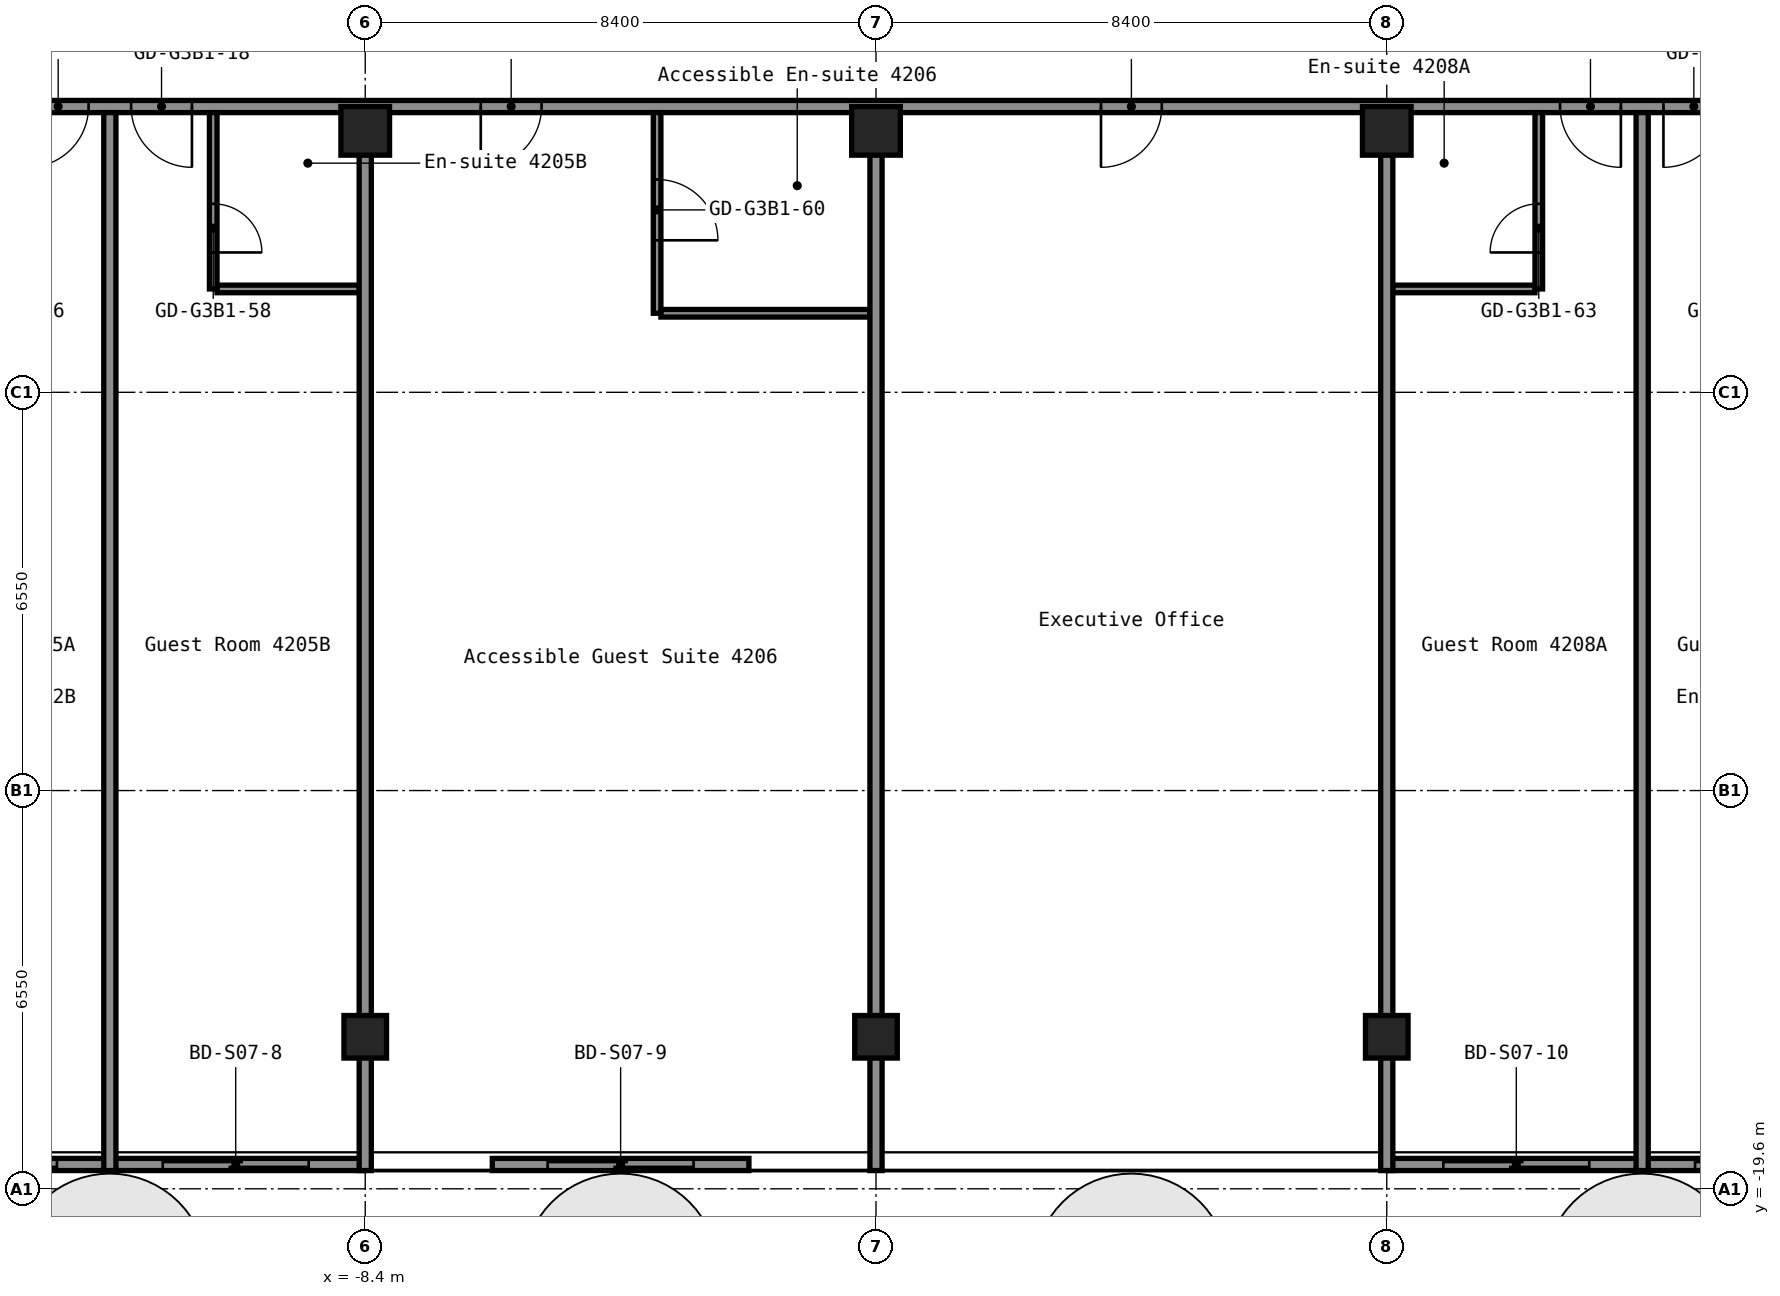
"""IFC4 building model, lengths in metres.
Left out: names, types, materials, properties, quantities, classifications, styles, units other than length and angle.
Written with IfcOpenShell. Run it as: python <this file> out.ifc"""

import sys

from ifc_helpers import new_model, si_unit, direction, frame, frame_2d, origin, origin_2d, place, context, subcontext, project, spatial, rectangle, hollow_rectangle, extrude, element, fill, save


model = new_model("IFC4")
c1 = context("Model", 3, precision=1e-05, world=origin(), true_north=direction((0.0, 1.0)))
c2 = subcontext(c1, "Body", "Model", "MODEL_VIEW")
j1 = project(units=[si_unit("LENGTHUNIT", "METRE"), si_unit("PLANEANGLEUNIT", "RADIAN")], contexts=[c1])
p1 = place(None, origin())
s1 = spatial("IfcSite", under=j1, at=p1, CompositionType="ELEMENT")
p2 = place(p1, origin())
s2 = spatial("IfcBuilding", under=s1, at=p2, CompositionType="ELEMENT")
p3 = place(p2, frame((0.0, 0.0, 150.2)))
s3 = spatial("IfcBuildingStorey", under=s2, at=p3, CompositionType="ELEMENT", Elevation=150.2)
p4 = place(p3, frame((-8.4, -17.1, 0.0), z_axis=(0.0, 0.0, 1.0), x_axis=(1.0, 0.0, 0.0)))
e1 = element("IfcColumn", 1, at=p4, inside=s3, PredefinedType="COLUMN", context=c2, shape_type="SweptSolid", body=[
    extrude(hollow_rectangle(XDim=0.7, YDim=0.7, WallThickness=0.028, at=origin_2d()), origin(), (0.0, 0.0, 1.0), 2.75),
])
p5 = place(p3, frame((-8.4, -2.2, 0.0), z_axis=(0.0, 0.0, 1.0), x_axis=(1.0, 0.0, 0.0)))
e2 = element("IfcColumn", 2, at=p5, inside=s3, PredefinedType="COLUMN", context=c2, shape_type="SweptSolid", body=[
    extrude(hollow_rectangle(XDim=0.8, YDim=0.8, WallThickness=0.032, at=origin_2d()), origin(), (0.0, 0.0, 1.0), 2.75),
])
p6 = place(p3, frame((0.0, -17.1, 0.0), z_axis=(0.0, 0.0, 1.0), x_axis=(1.0, 0.0, 0.0)))
e3 = element("IfcColumn", 3, at=p6, inside=s3, PredefinedType="COLUMN", context=c2, shape_type="SweptSolid", body=[
    extrude(hollow_rectangle(XDim=0.7, YDim=0.7, WallThickness=0.028, at=origin_2d()), origin(), (0.0, 0.0, 1.0), 2.75),
])
p7 = place(p3, frame((0.0, -2.2, 0.0), z_axis=(0.0, 0.0, 1.0), x_axis=(1.0, 0.0, 0.0)))
e4 = element("IfcColumn", 4, at=p7, inside=s3, PredefinedType="COLUMN", context=c2, shape_type="SweptSolid", body=[
    extrude(hollow_rectangle(XDim=0.8, YDim=0.8, WallThickness=0.032, at=origin_2d()), origin(), (0.0, 0.0, 1.0), 2.75),
])
p8 = place(p3, frame((8.4, -17.1, 0.0), z_axis=(0.0, 0.0, 1.0), x_axis=(1.0, 0.0, 0.0)))
e5 = element("IfcColumn", 5, at=p8, inside=s3, PredefinedType="COLUMN", context=c2, shape_type="SweptSolid", body=[
    extrude(hollow_rectangle(XDim=0.7, YDim=0.7, WallThickness=0.028, at=origin_2d()), origin(), (0.0, 0.0, 1.0), 2.75),
])
p9 = place(p3, frame((8.4, -2.2, 0.0), z_axis=(0.0, 0.0, 1.0), x_axis=(1.0, 0.0, 0.0)))
e6 = element("IfcColumn", 6, at=p9, inside=s3, PredefinedType="COLUMN", context=c2, shape_type="SweptSolid", body=[
    extrude(hollow_rectangle(XDim=0.8, YDim=0.8, WallThickness=0.032, at=origin_2d()), origin(), (0.0, 0.0, 1.0), 2.75),
])
p10 = place(p3, frame((-3.538, -5.2, 0.0), z_axis=(0.0, 0.0, 1.0), x_axis=(1.0, 0.0, 0.0)))
e7 = element("IfcWall", 7, at=p10, inside=s3, PredefinedType="PARTITIONING", context=c2, shape_type="SweptSolid", body=[
    extrude(rectangle(XDim=3.438, YDim=0.125, at=frame_2d((1.719, 0.0))), origin(), (0.0, 0.0, 1.0), 2.75),
])
for number, where, z_axis, x_axis in (
    (8, (-10.837, -4.8, 0.0), (0.0, 0.0, 1.0), (1.0, 0.0, 0.0)),
    (9, (8.5, -4.8, 0.0), (0.0, 0.0, 1.0), (1.0, 0.0, 0.0)),
):
    element("IfcWall", number, at=place(p3, frame(where, z_axis=z_axis, x_axis=x_axis)), inside=s3, PredefinedType="PARTITIONING", context=c2, shape_type="SweptSolid", body=[
        extrude(rectangle(XDim=2.337, YDim=0.125, at=frame_2d((1.169, 0.0))), origin(), (0.0, 0.0, 1.0), 2.75),
    ])
p11 = place(p3, frame((-16.8, -1.8, 0.0), z_axis=(0.0, 0.0, 1.0), x_axis=(1.0, 0.0, 0.0)))
e10 = element("IfcWall", 10, at=p11, inside=s3, PredefinedType="PARTITIONING", context=c2, shape_type="SweptSolid", body=[
    extrude(rectangle(XDim=33.6, YDim=0.2, at=frame_2d((16.8, 0.0))), origin(), (0.0, 0.0, 1.0), 2.75),
])
p12 = place(p11, frame((2.85, 0.0, 0.0)))
e11 = element("IfcOpeningElement", 11, at=p12, cuts=e10, PredefinedType="OPENING", context=c2, shape_type="SweptSolid", body=[
    extrude(rectangle(XDim=1.0, YDim=2.1, at=frame_2d((0.5, 1.05))), frame((0.0, 0.11, 0.0), z_axis=(0.0, -1.0, 0.0), x_axis=(1.0, 0.0, 0.0)), (0.0, 0.0, 1.0), 0.22),
])
p13 = place(p11, frame((4.55, 0.0, 0.0)))
e12 = element("IfcOpeningElement", 12, at=p13, cuts=e10, PredefinedType="OPENING", context=c2, shape_type="SweptSolid", body=[
    extrude(rectangle(XDim=1.0, YDim=2.1, at=frame_2d((0.5, 1.05))), frame((0.0, 0.11, 0.0), z_axis=(0.0, -1.0, 0.0), x_axis=(1.0, 0.0, 0.0)), (0.0, 0.0, 1.0), 0.22),
])
p14 = place(p11, frame((10.3, 0.0, 0.0)))
e13 = element("IfcOpeningElement", 13, at=p14, cuts=e10, PredefinedType="OPENING", context=c2, shape_type="SweptSolid", body=[
    extrude(rectangle(XDim=1.0, YDim=2.1, at=frame_2d((0.5, 1.05))), frame((0.0, 0.11, 0.0), z_axis=(0.0, -1.0, 0.0), x_axis=(1.0, 0.0, 0.0)), (0.0, 0.0, 1.0), 0.22),
])
p15 = place(p11, frame((20.5, 0.0, 0.0)))
e14 = element("IfcOpeningElement", 14, at=p15, cuts=e10, PredefinedType="OPENING", context=c2, shape_type="SweptSolid", body=[
    extrude(rectangle(XDim=1.0, YDim=2.1, at=frame_2d((0.5, 1.05))), frame((0.0, 0.11, 0.0), z_axis=(0.0, -1.0, 0.0), x_axis=(1.0, 0.0, 0.0)), (0.0, 0.0, 1.0), 0.22),
])
p16 = place(p11, frame((28.05, 0.0, 0.0)))
e15 = element("IfcOpeningElement", 15, at=p16, cuts=e10, PredefinedType="OPENING", context=c2, shape_type="SweptSolid", body=[
    extrude(rectangle(XDim=1.0, YDim=2.1, at=frame_2d((0.5, 1.05))), frame((0.0, 0.11, 0.0), z_axis=(0.0, -1.0, 0.0), x_axis=(1.0, 0.0, 0.0)), (0.0, 0.0, 1.0), 0.22),
])
p17 = place(p11, frame((29.75, 0.0, 0.0)))
e16 = element("IfcOpeningElement", 16, at=p17, cuts=e10, PredefinedType="OPENING", context=c2, shape_type="SweptSolid", body=[
    extrude(rectangle(XDim=1.0, YDim=2.1, at=frame_2d((0.5, 1.05))), frame((0.0, 0.11, 0.0), z_axis=(0.0, -1.0, 0.0), x_axis=(1.0, 0.0, 0.0)), (0.0, 0.0, 1.0), 0.22),
])
p18 = place(p3, frame((-12.6, -19.3, 0.0), z_axis=(0.0, 0.0, 1.0), x_axis=(0.0, 1.0, 0.0)))
e17 = element("IfcWall", 17, at=p18, inside=s3, PredefinedType="PARTITIONING", context=c2, shape_type="SweptSolid", body=[
    extrude(rectangle(XDim=17.4, YDim=0.2, at=frame_2d((8.7, 0.0))), origin(), (0.0, 0.0, 1.0), 2.75),
])
p19 = place(p3, frame((-10.9, -4.8, 0.0), z_axis=(0.0, 0.0, 1.0), x_axis=(0.0, 1.0, 0.0)))
e18 = element("IfcWall", 18, at=p19, inside=s3, PredefinedType="PARTITIONING", context=c2, shape_type="SweptSolid", body=[
    extrude(rectangle(XDim=2.9, YDim=0.125, at=frame_2d((1.45, 0.0))), origin(), (0.0, 0.0, 1.0), 2.75),
])
p20 = place(p19, frame((0.6, 0.0, 0.0)))
e19 = element("IfcOpeningElement", 19, at=p20, cuts=e18, PredefinedType="OPENING", context=c2, shape_type="SweptSolid", body=[
    extrude(rectangle(XDim=0.8, YDim=2.1, at=frame_2d((0.4, 1.05))), frame((0.0, 0.073, 0.0), z_axis=(0.0, -1.0, 0.0), x_axis=(1.0, 0.0, 0.0)), (0.0, 0.0, 1.0), 0.145),
])
p21 = place(p3, frame((-8.4, -19.3, 0.0), z_axis=(0.0, 0.0, 1.0), x_axis=(0.0, 1.0, 0.0)))
e20 = element("IfcWall", 20, at=p21, inside=s3, PredefinedType="PARTITIONING", context=c2, shape_type="SweptSolid", body=[
    extrude(rectangle(XDim=16.71, YDim=0.2, at=frame_2d((8.355, 0.0))), origin(), (0.0, 0.0, 1.0), 2.75),
])
p22 = place(p3, frame((-3.6, -5.2, 0.0), z_axis=(0.0, 0.0, 1.0), x_axis=(0.0, 1.0, 0.0)))
e21 = element("IfcWall", 21, at=p22, inside=s3, PredefinedType="PARTITIONING", context=c2, shape_type="SweptSolid", body=[
    extrude(rectangle(XDim=3.3, YDim=0.125, at=frame_2d((1.65, 0.0))), origin(), (0.0, 0.0, 1.0), 2.75),
])
p23 = place(p22, frame((1.2, 0.0, 0.0)))
e22 = element("IfcOpeningElement", 22, at=p23, cuts=e21, PredefinedType="OPENING", context=c2, shape_type="SweptSolid", body=[
    extrude(rectangle(XDim=1.0, YDim=2.1, at=frame_2d((0.5, 1.05))), frame((0.0, 0.073, 0.0), z_axis=(0.0, -1.0, 0.0), x_axis=(1.0, 0.0, 0.0)), (0.0, 0.0, 1.0), 0.145),
])
for number, where, z_axis, x_axis in (
    (23, (0.0, -19.3, 0.0), (0.0, 0.0, 1.0), (0.0, 1.0, 0.0)),
    (24, (8.4, -19.3, 0.0), (0.0, 0.0, 1.0), (0.0, 1.0, 0.0)),
):
    element("IfcWall", number, at=place(p3, frame(where, z_axis=z_axis, x_axis=x_axis)), inside=s3, PredefinedType="PARTITIONING", context=c2, shape_type="SweptSolid", body=[
        extrude(rectangle(XDim=16.71, YDim=0.2, at=frame_2d((8.355, 0.0))), origin(), (0.0, 0.0, 1.0), 2.75),
    ])
p24 = place(p3, frame((10.9, -4.8, 0.0), z_axis=(0.0, 0.0, 1.0), x_axis=(0.0, 1.0, 0.0)))
e25 = element("IfcWall", 25, at=p24, inside=s3, PredefinedType="PARTITIONING", context=c2, shape_type="SweptSolid", body=[
    extrude(rectangle(XDim=2.9, YDim=0.125, at=frame_2d((1.45, 0.0))), origin(), (0.0, 0.0, 1.0), 2.75),
])
p25 = place(p24, frame((0.6, 0.0, 0.0)))
e26 = element("IfcOpeningElement", 26, at=p25, cuts=e25, PredefinedType="OPENING", context=c2, shape_type="SweptSolid", body=[
    extrude(rectangle(XDim=0.8, YDim=2.1, at=frame_2d((0.4, 1.05))), frame((0.0, 0.073, 0.0), z_axis=(0.0, -1.0, 0.0), x_axis=(1.0, 0.0, 0.0)), (0.0, 0.0, 1.0), 0.145),
])
p26 = place(p3, frame((12.6, -19.3, 0.0), z_axis=(0.0, 0.0, 1.0), x_axis=(0.0, 1.0, 0.0)))
e27 = element("IfcWall", 27, at=p26, inside=s3, PredefinedType="PARTITIONING", context=c2, shape_type="SweptSolid", body=[
    extrude(rectangle(XDim=17.4, YDim=0.2, at=frame_2d((8.7, 0.0))), origin(), (0.0, 0.0, 1.0), 2.75),
])
p27 = place(p3, frame((-16.78, -19.2, 0.0), z_axis=(0.0, 0.0, 1.0), x_axis=(1.0, 0.0, 0.0)))
p28 = place(p27, frame((0.91, 0.0, 0.0)))
p29 = place(p28, frame((2.4, 0.0, 0.0), z_axis=(0.0, 0.0, 1.0), x_axis=(-1.0, 0.0, 0.0)))
e28 = element("IfcDoor", 28, at=p29, inside=s3, OperationType="SLIDING_TO_LEFT", PredefinedType="DOOR", context=c2, shape_type="SweptSolid", body=[
    extrude(rectangle(XDim=2.4, YDim=2.2, at=frame_2d((1.2, 1.1))), frame((0.0, 0.025, 0.0), z_axis=(0.0, -1.0, 0.0), x_axis=(1.0, 0.0, 0.0)), (0.0, 0.0, 1.0), 0.05),
])
p30 = place(p3, frame((-12.64, -19.2, 0.0), z_axis=(0.0, 0.0, 1.0), x_axis=(1.0, 0.0, 0.0)))
p31 = place(p30, frame((0.91, 0.0, 0.0)))
p32 = place(p31, frame((2.4, 0.0, 0.0), z_axis=(0.0, 0.0, 1.0), x_axis=(-1.0, 0.0, 0.0)))
e29 = element("IfcDoor", 29, at=p32, inside=s3, OperationType="SLIDING_TO_LEFT", PredefinedType="DOOR", context=c2, shape_type="SweptSolid", body=[
    extrude(rectangle(XDim=2.4, YDim=2.2, at=frame_2d((1.2, 1.1))), frame((0.0, 0.025, 0.0), z_axis=(0.0, -1.0, 0.0), x_axis=(1.0, 0.0, 0.0)), (0.0, 0.0, 1.0), 0.05),
])
p33 = place(p3, frame((-6.31, -19.2, 0.0), z_axis=(0.0, 0.0, 1.0), x_axis=(1.0, 0.0, 0.0)))
p34 = place(p33, frame((0.91, 0.0, 0.0)))
p35 = place(p34, frame((2.4, 0.0, 0.0), z_axis=(0.0, 0.0, 1.0), x_axis=(-1.0, 0.0, 0.0)))
e30 = element("IfcDoor", 30, at=p35, inside=s3, OperationType="SLIDING_TO_LEFT", PredefinedType="DOOR", context=c2, shape_type="SweptSolid", body=[
    extrude(rectangle(XDim=2.4, YDim=2.2, at=frame_2d((1.2, 1.1))), frame((0.0, 0.025, 0.0), z_axis=(0.0, -1.0, 0.0), x_axis=(1.0, 0.0, 0.0)), (0.0, 0.0, 1.0), 0.05),
])
p36 = place(p3, frame((8.42, -19.2, 0.0), z_axis=(0.0, 0.0, 1.0), x_axis=(1.0, 0.0, 0.0)))
p37 = place(p36, frame((0.91, 0.0, 0.0)))
p38 = place(p37, frame((2.4, 0.0, 0.0), z_axis=(0.0, 0.0, 1.0), x_axis=(-1.0, 0.0, 0.0)))
e31 = element("IfcDoor", 31, at=p38, inside=s3, OperationType="SLIDING_TO_LEFT", PredefinedType="DOOR", context=c2, shape_type="SweptSolid", body=[
    extrude(rectangle(XDim=2.4, YDim=2.2, at=frame_2d((1.2, 1.1))), frame((0.0, 0.025, 0.0), z_axis=(0.0, -1.0, 0.0), x_axis=(1.0, 0.0, 0.0)), (0.0, 0.0, 1.0), 0.05),
])
p39 = place(p3, frame((12.56, -19.2, 0.0), z_axis=(0.0, 0.0, 1.0), x_axis=(1.0, 0.0, 0.0)))
p40 = place(p39, frame((0.91, 0.0, 0.0)))
p41 = place(p40, frame((2.4, 0.0, 0.0), z_axis=(0.0, 0.0, 1.0), x_axis=(-1.0, 0.0, 0.0)))
e32 = element("IfcDoor", 32, at=p41, inside=s3, OperationType="SLIDING_TO_LEFT", PredefinedType="DOOR", context=c2, shape_type="SweptSolid", body=[
    extrude(rectangle(XDim=2.4, YDim=2.2, at=frame_2d((1.2, 1.1))), frame((0.0, 0.025, 0.0), z_axis=(0.0, -1.0, 0.0), x_axis=(1.0, 0.0, 0.0)), (0.0, 0.0, 1.0), 0.05),
])
p42 = place(p12, origin())
e33 = element("IfcDoor", 33, at=p42, inside=s3, OperationType="SINGLE_SWING_LEFT", PredefinedType="DOOR", context=c2, shape_type="SweptSolid", body=[
    extrude(rectangle(XDim=1.0, YDim=2.1, at=frame_2d((0.5, 1.05))), frame((0.0, 0.025, 0.0), z_axis=(0.0, -1.0, 0.0), x_axis=(1.0, 0.0, 0.0)), (0.0, 0.0, 1.0), 0.05),
])
fill(e11, e33)
p43 = place(p13, origin())
e34 = element("IfcDoor", 34, at=p43, inside=s3, OperationType="SINGLE_SWING_RIGHT", PredefinedType="DOOR", context=c2, shape_type="SweptSolid", body=[
    extrude(rectangle(XDim=1.0, YDim=2.1, at=frame_2d((0.5, 1.05))), frame((0.0, 0.025, 0.0), z_axis=(0.0, -1.0, 0.0), x_axis=(1.0, 0.0, 0.0)), (0.0, 0.0, 1.0), 0.05),
])
fill(e12, e34)
p44 = place(p14, origin())
e35 = element("IfcDoor", 35, at=p44, inside=s3, OperationType="SINGLE_SWING_LEFT", PredefinedType="DOOR", context=c2, shape_type="SweptSolid", body=[
    extrude(rectangle(XDim=1.0, YDim=2.1, at=frame_2d((0.5, 1.05))), frame((0.0, 0.025, 0.0), z_axis=(0.0, -1.0, 0.0), x_axis=(1.0, 0.0, 0.0)), (0.0, 0.0, 1.0), 0.05),
])
fill(e13, e35)
p45 = place(p15, origin())
e36 = element("IfcDoor", 36, at=p45, inside=s3, OperationType="SINGLE_SWING_LEFT", PredefinedType="DOOR", context=c2, shape_type="SweptSolid", body=[
    extrude(rectangle(XDim=1.0, YDim=2.1, at=frame_2d((0.5, 1.05))), frame((0.0, 0.025, 0.0), z_axis=(0.0, -1.0, 0.0), x_axis=(1.0, 0.0, 0.0)), (0.0, 0.0, 1.0), 0.05),
])
fill(e14, e36)
p46 = place(p16, origin())
e37 = element("IfcDoor", 37, at=p46, inside=s3, OperationType="SINGLE_SWING_RIGHT", PredefinedType="DOOR", context=c2, shape_type="SweptSolid", body=[
    extrude(rectangle(XDim=1.0, YDim=2.1, at=frame_2d((0.5, 1.05))), frame((0.0, 0.025, 0.0), z_axis=(0.0, -1.0, 0.0), x_axis=(1.0, 0.0, 0.0)), (0.0, 0.0, 1.0), 0.05),
])
fill(e15, e37)
p47 = place(p17, origin())
e38 = element("IfcDoor", 38, at=p47, inside=s3, OperationType="SINGLE_SWING_LEFT", PredefinedType="DOOR", context=c2, shape_type="SweptSolid", body=[
    extrude(rectangle(XDim=1.0, YDim=2.1, at=frame_2d((0.5, 1.05))), frame((0.0, 0.025, 0.0), z_axis=(0.0, -1.0, 0.0), x_axis=(1.0, 0.0, 0.0)), (0.0, 0.0, 1.0), 0.05),
])
fill(e16, e38)
p48 = place(p20, origin())
e39 = element("IfcDoor", 39, at=p48, inside=s3, OperationType="SINGLE_SWING_LEFT", PredefinedType="DOOR", context=c2, shape_type="SweptSolid", body=[
    extrude(rectangle(XDim=0.8, YDim=2.1, at=frame_2d((0.4, 1.05))), frame((0.0, 0.025, 0.0), z_axis=(0.0, -1.0, 0.0), x_axis=(1.0, 0.0, 0.0)), (0.0, 0.0, 1.0), 0.05),
])
fill(e19, e39)
p49 = place(p23, origin())
e40 = element("IfcDoor", 40, at=p49, inside=s3, OperationType="SINGLE_SWING_LEFT", PredefinedType="DOOR", context=c2, shape_type="SweptSolid", body=[
    extrude(rectangle(XDim=1.0, YDim=2.1, at=frame_2d((0.5, 1.05))), frame((0.0, 0.025, 0.0), z_axis=(0.0, -1.0, 0.0), x_axis=(1.0, 0.0, 0.0)), (0.0, 0.0, 1.0), 0.05),
])
fill(e22, e40)
p50 = place(p25, origin())
e41 = element("IfcDoor", 41, at=p50, inside=s3, OperationType="SINGLE_SWING_RIGHT", PredefinedType="DOOR", context=c2, shape_type="SweptSolid", body=[
    extrude(rectangle(XDim=0.8, YDim=2.1, at=frame_2d((0.4, 1.05))), frame((0.0, 0.025, 0.0), z_axis=(0.0, -1.0, 0.0), x_axis=(1.0, 0.0, 0.0)), (0.0, 0.0, 1.0), 0.05),
])
fill(e26, e41)
save(model, sys.argv[1])
